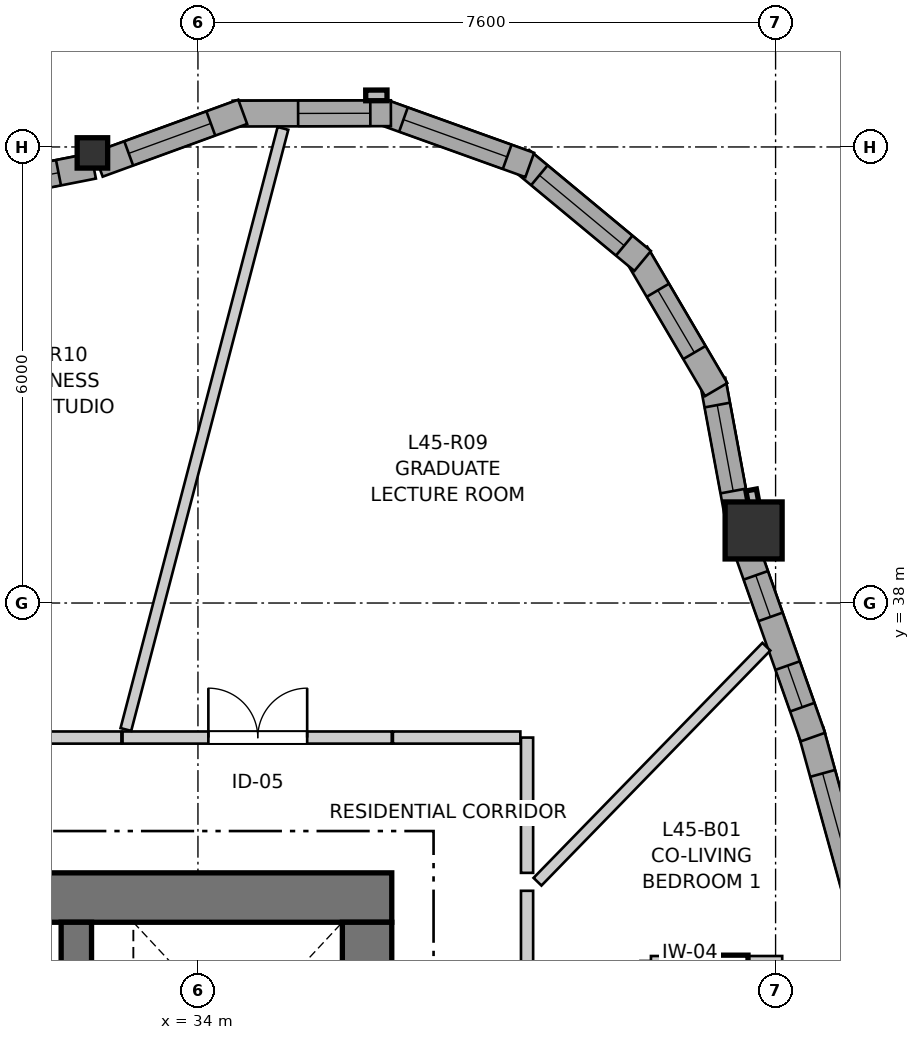
"""IFC4 building model, lengths in metres.
Left out: names, types, materials, properties, quantities, classifications, styles, units other than length and angle.
Written with IfcOpenShell. Run it as: python <this file> out.ifc"""

import sys

from ifc_helpers import new_model, si_unit, direction, frame, frame_2d, origin, origin_2d, place, context, subcontext, project, spatial, rectangle, i_section, extrude, source, transform, mapped, element, fill, save


model = new_model("IFC4")
c1 = context("Model", 3, precision=1e-05, world=origin(), true_north=direction((0.0, 1.0)))
c2 = subcontext(c1, "Body", "Model", "MODEL_VIEW")
j1 = project(units=[si_unit("LENGTHUNIT", "METRE"), si_unit("PLANEANGLEUNIT", "RADIAN")], contexts=[c1])
p1 = place(None, origin())
s1 = spatial("IfcSite", under=j1, at=p1, CompositionType="ELEMENT")
p2 = place(p1, origin())
s2 = spatial("IfcBuilding", under=s1, at=p2, CompositionType="ELEMENT")
p3 = place(p2, frame((0.0, 0.0, 152.2)))
s3 = spatial("IfcBuildingStorey", under=s2, at=p3, CompositionType="ELEMENT", Elevation=152.2)
p4 = place(p3, frame((36.55, 34.125, 0.0), z_axis=(0.0, 0.0, 1.0), x_axis=(-1.0, 0.0, 0.0)))
e1 = element("IfcWall", 1, at=p4, inside=s3, PredefinedType="SHEAR", context=c2, shape_type="SweptSolid", body=[
    extrude(rectangle(XDim=12.4, YDim=0.65, at=frame_2d((6.2, 0.0))), origin(), (0.0, 0.0, 1.0), 2.935),
])
p5 = place(p3, frame((36.225, 18.2, 0.0), z_axis=(0.0, 0.0, 1.0), x_axis=(0.0, 1.0, 0.0)))
e2 = element("IfcWall", 2, at=p5, inside=s3, PredefinedType="SHEAR", context=c2, shape_type="SweptSolid", body=[
    extrude(rectangle(XDim=15.6, YDim=0.65, at=frame_2d((7.8, 0.0))), origin(), (0.0, 0.0, 1.0), 2.935),
])
p6 = place(p5, frame((4.25, 0.0, 0.0)))
e3 = element("IfcOpeningElement", 3, at=p6, cuts=e2, PredefinedType="OPENING", context=c2, shape_type="SweptSolid", body=[
    extrude(rectangle(XDim=1.1, YDim=2.15, at=frame_2d((0.55, 1.075))), frame((0.0, 0.335, 0.0), z_axis=(0.0, -1.0, 0.0), x_axis=(1.0, 0.0, 0.0)), (0.0, 0.0, 1.0), 0.67),
])
p7 = place(p5, frame((10.25, 0.0, 0.0)))
e4 = element("IfcOpeningElement", 4, at=p7, cuts=e2, PredefinedType="OPENING", context=c2, shape_type="SweptSolid", body=[
    extrude(rectangle(XDim=1.1, YDim=2.15, at=frame_2d((0.55, 1.075))), frame((0.0, 0.335, 0.0), z_axis=(0.0, -1.0, 0.0), x_axis=(1.0, 0.0, 0.0)), (0.0, 0.0, 1.0), 0.67),
])
p8 = place(p3, frame((32.4, 30.85, 0.0), z_axis=(0.0, 0.0, 1.0), x_axis=(0.0, 1.0, 0.0)))
e5 = element("IfcWall", 5, at=p8, inside=s3, PredefinedType="SHEAR", context=c2, shape_type="SweptSolid", body=[
    extrude(rectangle(XDim=2.95, YDim=0.4, at=frame_2d((1.475, 0.0))), origin(), (0.0, 0.0, 1.0), 2.935),
])
m1 = source(origin(), c2, "Body", "SweptSolid", [
    extrude(rectangle(XDim=0.75, YDim=0.75, at=origin_2d()), origin(), (0.0, 0.0, 1.0), 2.935),
])
p9 = place(p3, frame((41.311, 38.955, 0.0), z_axis=(0.0, 0.0, 1.0), x_axis=(1.0, 0.0, 0.0)))
e6 = element("IfcColumn", 6, at=p9, inside=s3, PredefinedType="COLUMN", context=c2, shape_type="MappedRepresentation", body=[
    mapped(m1, transform((0.0, 0.0, 0.0), x_axis=(1.0, 0.0, 0.0), y_axis=(0.0, 1.0, 0.0), z_axis=(0.0, 0.0, 1.0), scale=1.0)),
])
m2 = source(origin(), c2, "Body", "SweptSolid", [
    extrude(i_section(OverallWidth=0.401, OverallDepth=0.399, WebThickness=0.023, FlangeThickness=0.036, FilletRadius=0.015, at=origin_2d()), origin(), (0.0, 0.0, 1.0), 2.935),
])
p10 = place(p3, frame((32.611, 43.922, 0.0), z_axis=(0.0, 0.0, 1.0), x_axis=(1.0, 0.0, 0.0)))
e7 = element("IfcColumn", 7, at=p10, inside=s3, PredefinedType="PILASTER", context=c2, shape_type="MappedRepresentation", body=[
    mapped(m2, transform((0.0, 0.0, 0.0), x_axis=(1.0, 0.0, 0.0), y_axis=(0.0, 1.0, 0.0), z_axis=(0.0, 0.0, 1.0), scale=1.0)),
])
p11 = place(p3, frame((42.795, 33.674, 0.0), z_axis=(0.0, 0.0, 1.0), x_axis=(-0.266404970566, 0.963861188999, 0.0)))
e8 = element("IfcWall", 8, at=p11, inside=s3, PredefinedType="SOLIDWALL", context=c2, shape_type="SweptSolid", body=[
    extrude(rectangle(XDim=2.745, YDim=0.34, at=frame_2d((1.372, 0.0))), origin(), (0.0, 0.0, 1.0), 2.515),
])
p12 = place(p11, frame((0.562, 0.0, 0.82)))
e9 = element("IfcOpeningElement", 9, at=p12, cuts=e8, PredefinedType="OPENING", context=c2, shape_type="SweptSolid", body=[
    extrude(rectangle(XDim=1.6, YDim=1.35, at=frame_2d((0.8, 0.675))), frame((0.0, 0.18, 0.0), z_axis=(0.0, -1.0, 0.0), x_axis=(1.0, 0.0, 0.0)), (0.0, 0.0, 1.0), 0.36),
])
p13 = place(p3, frame((42.09, 36.236, 0.0), z_axis=(0.0, 0.0, 1.0), x_axis=(-0.332705243691, 0.943030869495, 0.0)))
e10 = element("IfcWall", 10, at=p13, inside=s3, PredefinedType="SOLIDWALL", context=c2, shape_type="SweptSolid", body=[
    extrude(rectangle(XDim=2.668, YDim=0.34, at=frame_2d((1.334, 0.0))), origin(), (0.0, 0.0, 1.0), 2.515),
])
p14 = place(p13, frame((0.417, 0.0, 0.82)))
e11 = element("IfcOpeningElement", 11, at=p14, cuts=e10, PredefinedType="OPENING", context=c2, shape_type="SweptSolid", body=[
    extrude(rectangle(XDim=0.58, YDim=1.35, at=frame_2d((0.29, 0.675))), frame((0.0, 0.18, 0.0), z_axis=(0.0, -1.0, 0.0), x_axis=(1.0, 0.0, 0.0)), (0.0, 0.0, 1.0), 0.36),
])
p15 = place(p13, frame((1.677, 0.0, 0.82)))
e12 = element("IfcOpeningElement", 12, at=p15, cuts=e10, PredefinedType="OPENING", context=c2, shape_type="SweptSolid", body=[
    extrude(rectangle(XDim=0.58, YDim=1.35, at=frame_2d((0.29, 0.675))), frame((0.0, 0.18, 0.0), z_axis=(0.0, -1.0, 0.0), x_axis=(1.0, 0.0, 0.0)), (0.0, 0.0, 1.0), 0.36),
])
p16 = place(p3, frame((41.115, 39.076, 0.0), z_axis=(0.0, 0.0, 1.0), x_axis=(-0.182320770307, 0.983239104549, 0.0)))
e13 = element("IfcWall", 13, at=p16, inside=s3, PredefinedType="SOLIDWALL", context=c2, shape_type="SweptSolid", body=[
    extrude(rectangle(XDim=1.888, YDim=0.34, at=frame_2d((0.944, 0.0))), origin(), (0.0, 0.0, 1.0), 2.515),
])
p17 = place(p16, frame((0.404, 0.0, 0.82)))
e14 = element("IfcOpeningElement", 14, at=p17, cuts=e13, PredefinedType="OPENING", context=c2, shape_type="SweptSolid", body=[
    extrude(rectangle(XDim=1.15, YDim=1.2, at=frame_2d((0.575, 0.6))), frame((0.0, 0.18, 0.0), z_axis=(0.0, -1.0, 0.0), x_axis=(1.0, 0.0, 0.0)), (0.0, 0.0, 1.0), 0.36),
])
p18 = place(p3, frame((40.818, 40.808, 0.0), z_axis=(0.0, 0.0, 1.0), x_axis=(-0.506312473438, 0.86235009088, 0.0)))
e15 = element("IfcWall", 15, at=p18, inside=s3, PredefinedType="SOLIDWALL", context=c2, shape_type="SweptSolid", body=[
    extrude(rectangle(XDim=2.081, YDim=0.34, at=frame_2d((1.041, 0.0))), origin(), (0.0, 0.0, 1.0), 2.515),
])
p19 = place(p18, frame((0.566, 0.0, 0.82)))
e16 = element("IfcOpeningElement", 16, at=p19, cuts=e15, PredefinedType="OPENING", context=c2, shape_type="SweptSolid", body=[
    extrude(rectangle(XDim=0.95, YDim=1.35, at=frame_2d((0.475, 0.675))), frame((0.0, 0.18, 0.0), z_axis=(0.0, -1.0, 0.0), x_axis=(1.0, 0.0, 0.0)), (0.0, 0.0, 1.0), 0.36),
])
p20 = place(p3, frame((39.851, 42.5, 0.0), z_axis=(0.0, 0.0, 1.0), x_axis=(-0.769642650648, 0.638474894028, 0.0)))
e17 = element("IfcWall", 17, at=p20, inside=s3, PredefinedType="SOLIDWALL", context=c2, shape_type="SweptSolid", body=[
    extrude(rectangle(XDim=2.081, YDim=0.34, at=frame_2d((1.041, 0.0))), origin(), (0.0, 0.0, 1.0), 2.515),
])
p21 = place(p20, frame((0.315, 0.0, 0.82)))
e18 = element("IfcOpeningElement", 18, at=p21, cuts=e17, PredefinedType="OPENING", context=c2, shape_type="SweptSolid", body=[
    extrude(rectangle(XDim=1.45, YDim=1.25, at=frame_2d((0.725, 0.625))), frame((0.0, 0.18, 0.0), z_axis=(0.0, -1.0, 0.0), x_axis=(1.0, 0.0, 0.0)), (0.0, 0.0, 1.0), 0.36),
])
p22 = place(p3, frame((38.365, 43.763, 0.0), z_axis=(0.0, 0.0, 1.0), x_axis=(-0.941071215914, 0.338208466153, 0.0)))
e19 = element("IfcWall", 19, at=p22, inside=s3, PredefinedType="SOLIDWALL", context=c2, shape_type="SweptSolid", body=[
    extrude(rectangle(XDim=2.081, YDim=0.34, at=frame_2d((1.041, 0.0))), origin(), (0.0, 0.0, 1.0), 2.515),
])
p23 = place(p22, frame((0.316, 0.0, 0.82)))
e20 = element("IfcOpeningElement", 20, at=p23, cuts=e19, PredefinedType="OPENING", context=c2, shape_type="SweptSolid", body=[
    extrude(rectangle(XDim=1.45, YDim=1.25, at=frame_2d((0.725, 0.625))), frame((0.0, 0.18, 0.0), z_axis=(0.0, -1.0, 0.0), x_axis=(1.0, 0.0, 0.0)), (0.0, 0.0, 1.0), 0.36),
])
p24 = place(p3, frame((36.538, 44.444, 0.0), z_axis=(0.0, 0.0, 1.0), x_axis=(-0.999997247411, -0.002346309825, 0.0)))
e21 = element("IfcWall", 21, at=p24, inside=s3, PredefinedType="SOLIDWALL", context=c2, shape_type="SweptSolid", body=[
    extrude(rectangle(XDim=2.081, YDim=0.34, at=frame_2d((1.041, 0.0))), origin(), (0.0, 0.0, 1.0), 2.515),
])
p25 = place(p24, frame((0.271, 0.0, 0.82)))
e22 = element("IfcOpeningElement", 22, at=p25, cuts=e21, PredefinedType="OPENING", context=c2, shape_type="SweptSolid", body=[
    extrude(rectangle(XDim=0.95, YDim=1.35, at=frame_2d((0.475, 0.675))), frame((0.0, 0.18, 0.0), z_axis=(0.0, -1.0, 0.0), x_axis=(1.0, 0.0, 0.0)), (0.0, 0.0, 1.0), 0.36),
])
p26 = place(p3, frame((34.589, 44.462, 0.0), z_axis=(0.0, 0.0, 1.0), x_axis=(-0.939387553708, -0.342857148007, 0.0)))
e23 = element("IfcWall", 23, at=p26, inside=s3, PredefinedType="SOLIDWALL", context=c2, shape_type="SweptSolid", body=[
    extrude(rectangle(XDim=2.023, YDim=0.34, at=frame_2d((1.011, 0.0))), origin(), (0.0, 0.0, 1.0), 2.515),
])
p27 = place(p26, frame((0.447, 0.0, 0.82)))
e24 = element("IfcOpeningElement", 24, at=p27, cuts=e23, PredefinedType="OPENING", context=c2, shape_type="SweptSolid", body=[
    extrude(rectangle(XDim=1.15, YDim=1.2, at=frame_2d((0.575, 0.6))), frame((0.0, 0.18, 0.0), z_axis=(0.0, -1.0, 0.0), x_axis=(1.0, 0.0, 0.0)), (0.0, 0.0, 1.0), 0.36),
])
p28 = place(p3, frame((32.625, 43.751, 0.0), z_axis=(0.0, 0.0, 1.0), x_axis=(-0.981232663103, -0.192827541756, 0.0)))
e25 = element("IfcWall", 25, at=p28, inside=s3, PredefinedType="SOLIDWALL", context=c2, shape_type="SweptSolid", body=[
    extrude(rectangle(XDim=2.756, YDim=0.34, at=frame_2d((1.378, 0.0))), origin(), (0.0, 0.0, 1.0), 2.515),
])
p29 = place(p28, frame((0.468, 0.0, 0.82)))
e26 = element("IfcOpeningElement", 26, at=p29, cuts=e25, PredefinedType="OPENING", context=c2, shape_type="SweptSolid", body=[
    extrude(rectangle(XDim=1.8, YDim=1.45, at=frame_2d((0.9, 0.725))), frame((0.0, 0.18, 0.0), z_axis=(0.0, -1.0, 0.0), x_axis=(1.0, 0.0, 0.0)), (0.0, 0.0, 1.0), 0.36),
])
p30 = place(p3, frame((38.33, 34.214, 0.0), z_axis=(0.0, 0.0, 1.0), x_axis=(0.0, -1.0, 0.0)))
e27 = element("IfcWall", 27, at=p30, inside=s3, PredefinedType="PARTITIONING", context=c2, shape_type="SweptSolid", body=[
    extrude(rectangle(XDim=4.093, YDim=0.16, at=frame_2d((2.046, 0.0))), origin(), (0.0, 0.0, 1.0), 2.935),
])
p31 = place(p30, frame((1.589, 0.0, 0.0)))
e28 = element("IfcOpeningElement", 28, at=p31, cuts=e27, PredefinedType="OPENING", context=c2, shape_type="SweptSolid", body=[
    extrude(rectangle(XDim=0.92, YDim=2.1, at=frame_2d((0.46, 1.05))), frame((0.0, 0.09, 0.0), z_axis=(0.0, -1.0, 0.0), x_axis=(1.0, 0.0, 0.0)), (0.0, 0.0, 1.0), 0.18),
])
p32 = place(p3, frame((33.008, 36.23, 0.0), z_axis=(0.0, 0.0, 1.0), x_axis=(1.0, 0.0, 0.0)))
e29 = element("IfcWall", 29, at=p32, inside=s3, PredefinedType="PARTITIONING", context=c2, shape_type="SweptSolid", body=[
    extrude(rectangle(XDim=3.542, YDim=0.16, at=frame_2d((1.771, 0.0))), origin(), (0.0, 0.0, 1.0), 2.573),
])
p33 = place(p32, frame((1.129, 0.0, 0.0)))
e30 = element("IfcOpeningElement", 30, at=p33, cuts=e29, PredefinedType="OPENING", context=c2, shape_type="SweptSolid", body=[
    extrude(rectangle(XDim=1.3, YDim=2.1, at=frame_2d((0.65, 1.05))), frame((0.0, 0.09, 0.0), z_axis=(0.0, -1.0, 0.0), x_axis=(1.0, 0.0, 0.0)), (0.0, 0.0, 1.0), 0.18),
])
p34 = place(p3, frame((30.055, 36.23, 0.0), z_axis=(0.0, 0.0, 1.0), x_axis=(1.0, 0.0, 0.0)))
e31 = element("IfcWall", 31, at=p34, inside=s3, PredefinedType="PARTITIONING", context=c2, shape_type="SweptSolid", body=[
    extrude(rectangle(XDim=2.938, YDim=0.16, at=frame_2d((1.469, 0.0))), origin(), (0.0, 0.0, 1.0), 2.573),
])
p35 = place(p34, frame((0.99, 0.0, 0.0)))
e32 = element("IfcOpeningElement", 32, at=p35, cuts=e31, PredefinedType="OPENING", context=c2, shape_type="SweptSolid", body=[
    extrude(rectangle(XDim=0.96, YDim=2.1, at=frame_2d((0.48, 1.05))), frame((0.0, 0.09, 0.0), z_axis=(0.0, -1.0, 0.0), x_axis=(1.0, 0.0, 0.0)), (0.0, 0.0, 1.0), 0.18),
])
p36 = place(p3, frame((39.887, 33.291, 0.0), z_axis=(0.0, 0.0, 1.0), x_axis=(0.0, -1.0, 0.0)))
e33 = element("IfcWall", 33, at=p36, inside=s3, PredefinedType="PARTITIONING", context=c2, shape_type="SweptSolid", body=[
    extrude(rectangle(XDim=1.9, YDim=0.13, at=frame_2d((0.95, 0.0))), origin(), (0.0, 0.0, 1.0), 2.935),
])
p37 = place(p36, frame((0.51, 0.0, 0.0)))
e34 = element("IfcOpeningElement", 34, at=p37, cuts=e33, PredefinedType="OPENING", context=c2, shape_type="SweptSolid", body=[
    extrude(rectangle(XDim=0.88, YDim=2.05, at=frame_2d((0.44, 1.025))), frame((0.0, 0.075, 0.0), z_axis=(0.0, -1.0, 0.0), x_axis=(1.0, 0.0, 0.0)), (0.0, 0.0, 1.0), 0.15),
])
p38 = place(p3, frame((33.052, 36.336, 0.0), z_axis=(0.0, 0.0, 1.0), x_axis=(0.252838925964, 0.967508386277, 0.0)))
e35 = element("IfcWall", 35, at=p38, inside=s3, PredefinedType="PARTITIONING", context=c2, shape_type="SweptSolid", body=[
    extrude(rectangle(XDim=8.174, YDim=0.145, at=frame_2d((4.087, 0.0))), origin(), (0.0, 0.0, 1.0), 2.935),
])
p39 = place(p3, frame((38.468, 34.333, 0.0), z_axis=(0.0, 0.0, 1.0), x_axis=(0.697683159601, 0.71640645503, 0.0)))
e36 = element("IfcWall", 36, at=p39, inside=s3, PredefinedType="PARTITIONING", context=c2, shape_type="SweptSolid", body=[
    extrude(rectangle(XDim=4.316, YDim=0.145, at=frame_2d((2.158, 0.0))), origin(), (0.0, 0.0, 1.0), 2.935),
])
p40 = place(p3, frame((39.96, 33.291, 0.0), z_axis=(0.0, 0.0, 1.0), x_axis=(1.0, 0.0, 0.0)))
e37 = element("IfcWall", 37, at=p40, inside=s3, PredefinedType="PARTITIONING", context=c2, shape_type="SweptSolid", body=[
    extrude(rectangle(XDim=1.727, YDim=0.13, at=frame_2d((0.864, 0.0))), origin(), (0.0, 0.0, 1.0), 2.935),
])
p41 = place(p3, frame((38.33, 34.45, 0.0), z_axis=(0.0, 0.0, 1.0), x_axis=(0.0, 1.0, 0.0)))
e38 = element("IfcWall", 38, at=p41, inside=s3, PredefinedType="PARTITIONING", context=c2, shape_type="SweptSolid", body=[
    extrude(rectangle(XDim=1.78, YDim=0.16, at=frame_2d((0.89, 0.0))), origin(), (0.0, 0.0, 1.0), 2.935),
])
p42 = place(p3, frame((36.565, 36.23, 0.0), z_axis=(0.0, 0.0, 1.0), x_axis=(1.0, 0.0, 0.0)))
e39 = element("IfcWall", 39, at=p42, inside=s3, PredefinedType="PARTITIONING", context=c2, shape_type="SweptSolid", body=[
    extrude(rectangle(XDim=1.677, YDim=0.16, at=frame_2d((0.838, 0.0))), origin(), (0.0, 0.0, 1.0), 2.935),
])
m3 = source(origin(), c2, "Body", "SweptSolid", [
    extrude(rectangle(XDim=1.6, YDim=1.35, at=frame_2d((0.8, 0.675))), frame((0.0, 0.03, 0.0), z_axis=(0.0, -1.0, 0.0), x_axis=(1.0, 0.0, 0.0)), (0.0, 0.0, 1.0), 0.06),
])
p43 = place(p12, origin())
e40 = element("IfcWindow", 40, at=p43, inside=s3, PartitioningType="SINGLE_PANEL", PredefinedType="WINDOW", context=c2, shape_type="MappedRepresentation", body=[
    mapped(m3, transform((0.0, 0.0, 0.0), x_axis=(1.0, 0.0, 0.0), y_axis=(0.0, 1.0, 0.0), z_axis=(0.0, 0.0, 1.0), scale=1.0)),
])
fill(e9, e40)
m4 = source(origin(), c2, "Body", "SweptSolid", [
    extrude(rectangle(XDim=0.58, YDim=1.35, at=frame_2d((0.29, 0.675))), frame((0.0, 0.03, 0.0), z_axis=(0.0, -1.0, 0.0), x_axis=(1.0, 0.0, 0.0)), (0.0, 0.0, 1.0), 0.06),
])
p44 = place(p14, origin())
e41 = element("IfcWindow", 41, at=p44, inside=s3, PartitioningType="SINGLE_PANEL", PredefinedType="WINDOW", context=c2, shape_type="MappedRepresentation", body=[
    mapped(m4, transform((0.0, 0.0, 0.0), x_axis=(1.0, 0.0, 0.0), y_axis=(0.0, 1.0, 0.0), z_axis=(0.0, 0.0, 1.0), scale=1.0)),
])
fill(e11, e41)
p45 = place(p15, origin())
e42 = element("IfcWindow", 42, at=p45, inside=s3, PartitioningType="SINGLE_PANEL", PredefinedType="WINDOW", context=c2, shape_type="MappedRepresentation", body=[
    mapped(m4, transform((0.0, 0.0, 0.0), x_axis=(1.0, 0.0, 0.0), y_axis=(0.0, 1.0, 0.0), z_axis=(0.0, 0.0, 1.0), scale=1.0)),
])
fill(e12, e42)
m5 = source(origin(), c2, "Body", "SweptSolid", [
    extrude(rectangle(XDim=1.15, YDim=1.2, at=frame_2d((0.575, 0.6))), frame((0.0, 0.03, 0.0), z_axis=(0.0, -1.0, 0.0), x_axis=(1.0, 0.0, 0.0)), (0.0, 0.0, 1.0), 0.06),
])
p46 = place(p17, origin())
e43 = element("IfcWindow", 43, at=p46, inside=s3, PartitioningType="SINGLE_PANEL", PredefinedType="WINDOW", context=c2, shape_type="MappedRepresentation", body=[
    mapped(m5, transform((0.0, 0.0, 0.0), x_axis=(1.0, 0.0, 0.0), y_axis=(0.0, 1.0, 0.0), z_axis=(0.0, 0.0, 1.0), scale=1.0)),
])
fill(e14, e43)
m6 = source(origin(), c2, "Body", "SweptSolid", [
    extrude(rectangle(XDim=0.95, YDim=1.35, at=frame_2d((0.475, 0.675))), frame((0.0, 0.03, 0.0), z_axis=(0.0, -1.0, 0.0), x_axis=(1.0, 0.0, 0.0)), (0.0, 0.0, 1.0), 0.06),
])
p47 = place(p19, origin())
e44 = element("IfcWindow", 44, at=p47, inside=s3, PartitioningType="SINGLE_PANEL", PredefinedType="WINDOW", context=c2, shape_type="MappedRepresentation", body=[
    mapped(m6, transform((0.0, 0.0, 0.0), x_axis=(1.0, 0.0, 0.0), y_axis=(0.0, 1.0, 0.0), z_axis=(0.0, 0.0, 1.0), scale=1.0)),
])
fill(e16, e44)
m7 = source(origin(), c2, "Body", "SweptSolid", [
    extrude(rectangle(XDim=1.45, YDim=1.25, at=frame_2d((0.725, 0.625))), frame((0.0, 0.03, 0.0), z_axis=(0.0, -1.0, 0.0), x_axis=(1.0, 0.0, 0.0)), (0.0, 0.0, 1.0), 0.06),
])
p48 = place(p21, origin())
e45 = element("IfcWindow", 45, at=p48, inside=s3, PartitioningType="SINGLE_PANEL", PredefinedType="WINDOW", context=c2, shape_type="MappedRepresentation", body=[
    mapped(m7, transform((0.0, 0.0, 0.0), x_axis=(1.0, 0.0, 0.0), y_axis=(0.0, 1.0, 0.0), z_axis=(0.0, 0.0, 1.0), scale=1.0)),
])
fill(e18, e45)
p49 = place(p23, origin())
e46 = element("IfcWindow", 46, at=p49, inside=s3, PartitioningType="SINGLE_PANEL", PredefinedType="WINDOW", context=c2, shape_type="MappedRepresentation", body=[
    mapped(m7, transform((0.0, 0.0, 0.0), x_axis=(1.0, 0.0, 0.0), y_axis=(0.0, 1.0, 0.0), z_axis=(0.0, 0.0, 1.0), scale=1.0)),
])
fill(e20, e46)
p50 = place(p25, origin())
e47 = element("IfcWindow", 47, at=p50, inside=s3, PartitioningType="SINGLE_PANEL", PredefinedType="WINDOW", context=c2, shape_type="MappedRepresentation", body=[
    mapped(m6, transform((0.0, 0.0, 0.0), x_axis=(1.0, 0.0, 0.0), y_axis=(0.0, 1.0, 0.0), z_axis=(0.0, 0.0, 1.0), scale=1.0)),
])
fill(e22, e47)
p51 = place(p27, origin())
e48 = element("IfcWindow", 48, at=p51, inside=s3, PartitioningType="SINGLE_PANEL", PredefinedType="WINDOW", context=c2, shape_type="MappedRepresentation", body=[
    mapped(m5, transform((0.0, 0.0, 0.0), x_axis=(1.0, 0.0, 0.0), y_axis=(0.0, 1.0, 0.0), z_axis=(0.0, 0.0, 1.0), scale=1.0)),
])
fill(e24, e48)
m8 = source(origin(), c2, "Body", "SweptSolid", [
    extrude(rectangle(XDim=1.8, YDim=1.45, at=frame_2d((0.9, 0.725))), frame((0.0, 0.03, 0.0), z_axis=(0.0, -1.0, 0.0), x_axis=(1.0, 0.0, 0.0)), (0.0, 0.0, 1.0), 0.06),
])
p52 = place(p29, origin())
e49 = element("IfcWindow", 49, at=p52, inside=s3, PartitioningType="SINGLE_PANEL", PredefinedType="WINDOW", context=c2, shape_type="MappedRepresentation", body=[
    mapped(m8, transform((0.0, 0.0, 0.0), x_axis=(1.0, 0.0, 0.0), y_axis=(0.0, 1.0, 0.0), z_axis=(0.0, 0.0, 1.0), scale=1.0)),
])
fill(e26, e49)
m9 = source(origin(), c2, "Body", "SweptSolid", [
    extrude(rectangle(XDim=1.3, YDim=2.1, at=frame_2d((0.65, 1.05))), frame((0.0, 0.025, 0.0), z_axis=(0.0, -1.0, 0.0), x_axis=(1.0, 0.0, 0.0)), (0.0, 0.0, 1.0), 0.05),
])
p53 = place(p33, origin())
e50 = element("IfcDoor", 50, at=p53, inside=s3, OperationType="DOUBLE_DOOR_SINGLE_SWING", PredefinedType="DOOR", context=c2, shape_type="MappedRepresentation", body=[
    mapped(m9, transform((0.0, 0.0, 0.0), x_axis=(1.0, 0.0, 0.0), y_axis=(0.0, 1.0, 0.0), z_axis=(0.0, 0.0, 1.0), scale=1.0)),
])
fill(e30, e50)
save(model, sys.argv[1])
